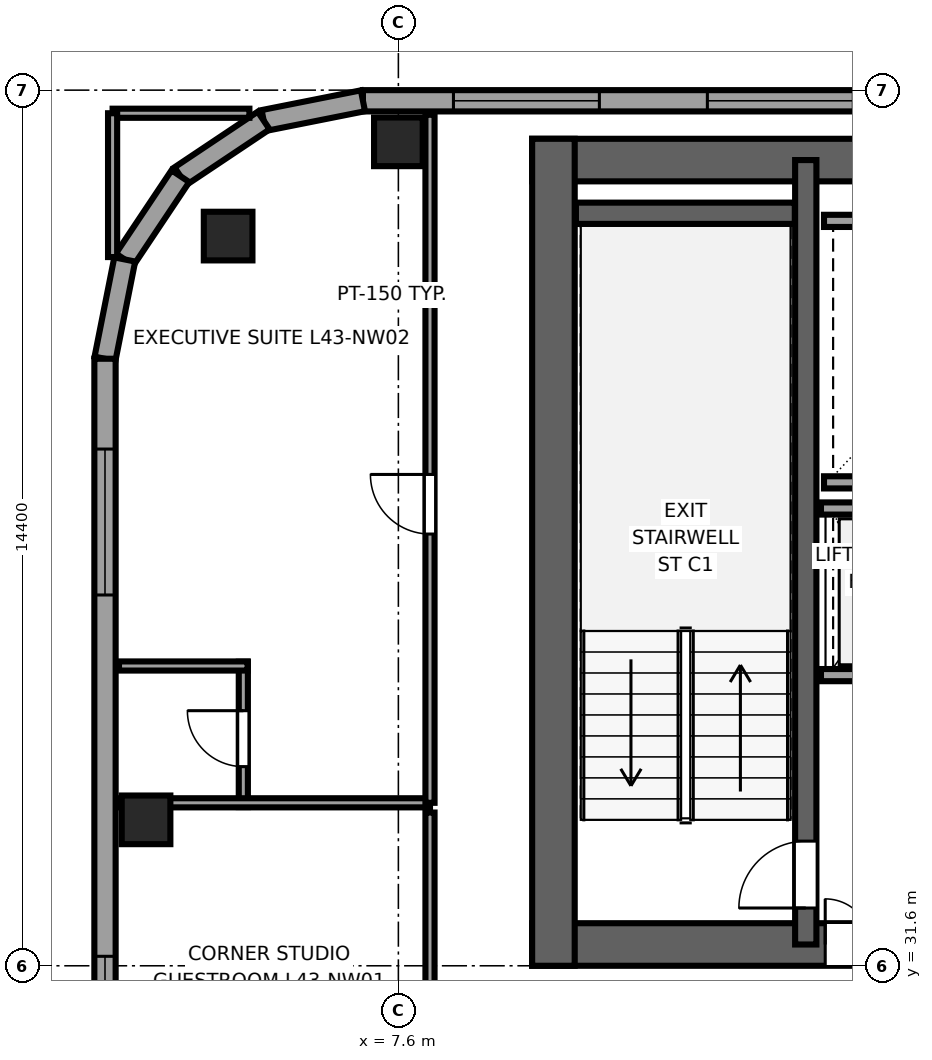
"""IFC4 building model, lengths in metres.
Left out: names, types, materials, properties, quantities, classifications, styles, units other than length and angle.
Written with IfcOpenShell. Run it as: python <this file> out.ifc"""

import sys

from ifc_helpers import new_model, si_unit, direction, frame, frame_2d, origin, origin_2d, place, context, subcontext, project, spatial, rectangle, extrude, source, transform, mapped, element, fill, save


model = new_model("IFC4")
c1 = context("Model", 3, precision=1e-05, world=origin(), true_north=direction((0.0, 1.0)))
c2 = subcontext(c1, "Body", "Model", "MODEL_VIEW")
j1 = project(units=[si_unit("LENGTHUNIT", "METRE"), si_unit("PLANEANGLEUNIT", "RADIAN")], contexts=[c1])
p1 = place(None, origin())
s1 = spatial("IfcSite", under=j1, at=p1, CompositionType="ELEMENT")
p2 = place(p1, origin())
s2 = spatial("IfcBuilding", under=s1, at=p2, CompositionType="ELEMENT")
p3 = place(p2, frame((0.0, 0.0, 164.8)))
s3 = spatial("IfcBuildingStorey", under=s2, at=p3, CompositionType="ELEMENT", Elevation=164.8)
p4 = place(p3, frame((9.8, 31.95, 0.0), z_axis=(0.0, 0.0, 1.0), x_axis=(1.0, 0.0, 0.0)))
e1 = element("IfcWall", 1, at=p4, inside=s3, PredefinedType="SHEAR", context=c2, shape_type="SweptSolid", body=[
    extrude(rectangle(XDim=26.4, YDim=0.7, at=frame_2d((13.2, 0.0))), origin(), (0.0, 0.0, 1.0), 3.55),
])
p5 = place(p4, frame((6.32, 0.0, 0.0), z_axis=(0.0, 0.0, 1.0), x_axis=(-1.0, 0.0, 0.0)))
e2 = element("IfcOpeningElement", 2, at=p5, cuts=e1, PredefinedType="OPENING", context=c2, shape_type="SweptSolid", body=[
    extrude(rectangle(XDim=1.5, YDim=2.04, at=frame_2d((0.75, 1.02))), frame((0.0, 0.36, 0.0), z_axis=(0.0, -1.0, 0.0), x_axis=(1.0, 0.0, 0.0)), (0.0, 0.0, 1.0), 0.72),
])
p6 = place(p4, frame((13.95, 0.0, 0.0), z_axis=(0.0, 0.0, 1.0), x_axis=(-1.0, 0.0, 0.0)))
e3 = element("IfcOpeningElement", 3, at=p6, cuts=e1, PredefinedType="OPENING", context=c2, shape_type="SweptSolid", body=[
    extrude(rectangle(XDim=1.5, YDim=2.04, at=frame_2d((0.75, 1.02))), frame((0.0, 0.36, 0.0), z_axis=(0.0, -1.0, 0.0), x_axis=(1.0, 0.0, 0.0)), (0.0, 0.0, 1.0), 0.72),
])
p7 = place(p4, frame((20.25, 0.0, 0.0), z_axis=(0.0, 0.0, 1.0), x_axis=(-1.0, 0.0, 0.0)))
e4 = element("IfcOpeningElement", 4, at=p7, cuts=e1, PredefinedType="OPENING", context=c2, shape_type="SweptSolid", body=[
    extrude(rectangle(XDim=1.5, YDim=2.04, at=frame_2d((0.75, 1.02))), frame((0.0, 0.36, 0.0), z_axis=(0.0, -1.0, 0.0), x_axis=(1.0, 0.0, 0.0)), (0.0, 0.0, 1.0), 0.72),
])
p8 = place(p4, frame((8.37, 0.0, 0.0), z_axis=(0.0, 0.0, 1.0), x_axis=(-1.0, 0.0, 0.0)))
e5 = element("IfcOpeningElement", 5, at=p8, cuts=e1, PredefinedType="OPENING", context=c2, shape_type="SweptSolid", body=[
    extrude(rectangle(XDim=0.82, YDim=2.01, at=frame_2d((0.41, 1.005))), frame((0.0, 0.36, 0.0), z_axis=(0.0, -1.0, 0.0), x_axis=(1.0, 0.0, 0.0)), (0.0, 0.0, 1.0), 0.72),
])
p9 = place(p3, frame((9.8, 44.85, 0.0), z_axis=(0.0, 0.0, 1.0), x_axis=(1.0, 0.0, 0.0)))
e6 = element("IfcWall", 6, at=p9, inside=s3, PredefinedType="SHEAR", context=c2, shape_type="SweptSolid", body=[
    extrude(rectangle(XDim=26.4, YDim=0.7, at=frame_2d((13.2, 0.0))), origin(), (0.0, 0.0, 1.0), 3.55),
])
p10 = place(p3, frame((10.15, 31.6, 0.0), z_axis=(0.0, 0.0, 1.0), x_axis=(0.0, 1.0, 0.0)))
e7 = element("IfcWall", 7, at=p10, inside=s3, PredefinedType="SHEAR", context=c2, shape_type="SweptSolid", body=[
    extrude(rectangle(XDim=13.6, YDim=0.7, at=frame_2d((6.8, 0.0))), origin(), (0.0, 0.0, 1.0), 3.55),
])
p11 = place(p3, frame((14.3, 31.95, 0.0), z_axis=(0.0, 0.0, 1.0), x_axis=(0.0, 1.0, 0.0)))
e8 = element("IfcWall", 8, at=p11, inside=s3, PredefinedType="SHEAR", context=c2, shape_type="SweptSolid", body=[
    extrude(rectangle(XDim=12.9, YDim=0.35, at=frame_2d((6.45, 0.0))), origin(), (0.0, 0.0, 1.0), 3.55),
])
p12 = place(p11, frame((0.6, 0.0, 0.0)))
e9 = element("IfcOpeningElement", 9, at=p12, cuts=e8, PredefinedType="OPENING", context=c2, shape_type="SweptSolid", body=[
    extrude(rectangle(XDim=1.1, YDim=2.12, at=frame_2d((0.55, 1.06))), frame((0.0, 0.185, 0.0), z_axis=(0.0, -1.0, 0.0), x_axis=(1.0, 0.0, 0.0)), (0.0, 0.0, 1.0), 0.37),
])
p13 = place(p3, frame((10.52, 43.975, 0.0), z_axis=(0.0, 0.0, 1.0), x_axis=(1.0, 0.0, 0.0)))
e10 = element("IfcWall", 10, at=p13, inside=s3, PredefinedType="SHEAR", context=c2, shape_type="SweptSolid", body=[
    extrude(rectangle(XDim=3.6, YDim=0.35, at=frame_2d((1.8, 0.0))), origin(), (0.0, 0.0, 1.0), 3.55),
])
m1 = source(origin(), c2, "Body", "SweptSolid", [
    extrude(rectangle(XDim=0.8, YDim=0.8, at=origin_2d()), origin(), (0.0, 0.0, 1.0), 3.55),
])
for number, where, z_axis, x_axis in (
    (11, (4.8, 43.6, 0.0), (0.0, 0.0, 1.0), (1.0, 0.0, 0.0)),
    (12, (7.6, 45.15, 0.0), (0.0, 0.0, 1.0), (1.0, 0.0, 0.0)),
    (13, (3.45, 34.0, 0.0), (0.0, 0.0, 1.0), (1.0, 0.0, 0.0)),
):
    element("IfcColumn", number, at=place(p3, frame(where, z_axis=z_axis, x_axis=x_axis)), inside=s3, PredefinedType="COLUMN", context=c2, shape_type="MappedRepresentation", body=[
        mapped(m1, transform((0.0, 0.0, 0.0), x_axis=(1.0, 0.0, 0.0), y_axis=(0.0, 1.0, 0.0), z_axis=(0.0, 0.0, 1.0), scale=1.0)),
    ])
p14 = place(p3, frame((49.983, 45.825, 0.0), z_axis=(0.0, 0.0, 1.0), x_axis=(-1.0, 0.0, 0.0)))
e14 = element("IfcWall", 14, at=p14, inside=s3, PredefinedType="SOLIDWALL", context=c2, shape_type="SweptSolid", body=[
    extrude(rectangle(XDim=42.966, YDim=0.35, at=frame_2d((21.483, 0.0))), origin(), (0.0, 0.0, 1.0), 3.37),
])
p15 = place(p14, frame((1.488, 0.0, 0.68)))
e15 = element("IfcOpeningElement", 15, at=p15, cuts=e14, PredefinedType="OPENING", context=c2, shape_type="SweptSolid", body=[
    extrude(rectangle(XDim=2.4, YDim=1.9, at=frame_2d((1.2, 0.95))), frame((0.0, 0.185, 0.0), z_axis=(0.0, -1.0, 0.0), x_axis=(1.0, 0.0, 0.0)), (0.0, 0.0, 1.0), 0.37),
])
p16 = place(p14, frame((9.841, 0.0, 0.68)))
e16 = element("IfcOpeningElement", 16, at=p16, cuts=e14, PredefinedType="OPENING", context=c2, shape_type="SweptSolid", body=[
    extrude(rectangle(XDim=2.4, YDim=1.9, at=frame_2d((1.2, 0.95))), frame((0.0, 0.185, 0.0), z_axis=(0.0, -1.0, 0.0), x_axis=(1.0, 0.0, 0.0)), (0.0, 0.0, 1.0), 0.37),
])
p17 = place(p14, frame((14.018, 0.0, 0.68)))
e17 = element("IfcOpeningElement", 17, at=p17, cuts=e14, PredefinedType="OPENING", context=c2, shape_type="SweptSolid", body=[
    extrude(rectangle(XDim=2.4, YDim=1.9, at=frame_2d((1.2, 0.95))), frame((0.0, 0.185, 0.0), z_axis=(0.0, -1.0, 0.0), x_axis=(1.0, 0.0, 0.0)), (0.0, 0.0, 1.0), 0.37),
])
p18 = place(p14, frame((18.195, 0.0, 0.68)))
e18 = element("IfcOpeningElement", 18, at=p18, cuts=e14, PredefinedType="OPENING", context=c2, shape_type="SweptSolid", body=[
    extrude(rectangle(XDim=2.4, YDim=1.9, at=frame_2d((1.2, 0.95))), frame((0.0, 0.185, 0.0), z_axis=(0.0, -1.0, 0.0), x_axis=(1.0, 0.0, 0.0)), (0.0, 0.0, 1.0), 0.37),
])
p19 = place(p14, frame((22.371, 0.0, 0.68)))
e19 = element("IfcOpeningElement", 19, at=p19, cuts=e14, PredefinedType="OPENING", context=c2, shape_type="SweptSolid", body=[
    extrude(rectangle(XDim=2.4, YDim=1.9, at=frame_2d((1.2, 0.95))), frame((0.0, 0.185, 0.0), z_axis=(0.0, -1.0, 0.0), x_axis=(1.0, 0.0, 0.0)), (0.0, 0.0, 1.0), 0.37),
])
p20 = place(p14, frame((26.548, 0.0, 0.68)))
e20 = element("IfcOpeningElement", 20, at=p20, cuts=e14, PredefinedType="OPENING", context=c2, shape_type="SweptSolid", body=[
    extrude(rectangle(XDim=2.4, YDim=1.9, at=frame_2d((1.2, 0.95))), frame((0.0, 0.185, 0.0), z_axis=(0.0, -1.0, 0.0), x_axis=(1.0, 0.0, 0.0)), (0.0, 0.0, 1.0), 0.37),
])
p21 = place(p14, frame((30.724, 0.0, 0.68)))
e21 = element("IfcOpeningElement", 21, at=p21, cuts=e14, PredefinedType="OPENING", context=c2, shape_type="SweptSolid", body=[
    extrude(rectangle(XDim=2.4, YDim=1.9, at=frame_2d((1.2, 0.95))), frame((0.0, 0.185, 0.0), z_axis=(0.0, -1.0, 0.0), x_axis=(1.0, 0.0, 0.0)), (0.0, 0.0, 1.0), 0.37),
])
p22 = place(p14, frame((34.901, 0.0, 0.68)))
e22 = element("IfcOpeningElement", 22, at=p22, cuts=e14, PredefinedType="OPENING", context=c2, shape_type="SweptSolid", body=[
    extrude(rectangle(XDim=2.4, YDim=1.9, at=frame_2d((1.2, 0.95))), frame((0.0, 0.185, 0.0), z_axis=(0.0, -1.0, 0.0), x_axis=(1.0, 0.0, 0.0)), (0.0, 0.0, 1.0), 0.37),
])
p23 = place(p14, frame((39.077, 0.0, 0.68)))
e23 = element("IfcOpeningElement", 23, at=p23, cuts=e14, PredefinedType="OPENING", context=c2, shape_type="SweptSolid", body=[
    extrude(rectangle(XDim=2.4, YDim=1.9, at=frame_2d((1.2, 0.95))), frame((0.0, 0.185, 0.0), z_axis=(0.0, -1.0, 0.0), x_axis=(1.0, 0.0, 0.0)), (0.0, 0.0, 1.0), 0.37),
])
p24 = place(p3, frame((7.017, 45.825, 0.0), z_axis=(0.0, 0.0, 1.0), x_axis=(-0.980788844421, -0.195072403631, 0.0)))
e24 = element("IfcWall", 24, at=p24, inside=s3, PredefinedType="SOLIDWALL", context=c2, shape_type="SweptSolid", body=[
    extrude(rectangle(XDim=1.665, YDim=0.35, at=frame_2d((0.832, 0.0))), origin(), (0.0, 0.0, 1.0), 3.37),
])
for number, where, z_axis, x_axis in (
    (25, (5.385, 45.5, 0.0), (0.0, 0.0, 1.0), (-0.832, -0.556, 0.0)),
    (26, (4.015, 44.585, 0.0), (0.0, 0.0, 1.0), (-0.556, -0.831, 0.0)),
):
    element("IfcWall", number, at=place(p3, frame(where, z_axis=z_axis, x_axis=x_axis)), inside=s3, PredefinedType="SOLIDWALL", context=c2, shape_type="SweptSolid", body=[
        extrude(rectangle(XDim=1.647, YDim=0.35, at=frame_2d((0.824, 0.0))), origin(), (0.0, 0.0, 1.0), 2.832),
    ])
p25 = place(p3, frame((3.1, 43.216, 0.0), z_axis=(0.0, 0.0, 1.0), x_axis=(-0.195044345786, -0.980794424524, 0.0)))
e27 = element("IfcWall", 27, at=p25, inside=s3, PredefinedType="SOLIDWALL", context=c2, shape_type="SweptSolid", body=[
    extrude(rectangle(XDim=1.665, YDim=0.35, at=frame_2d((0.833, 0.0))), origin(), (0.0, 0.0, 1.0), 3.37),
])
p26 = place(p3, frame((2.775, 41.583, 0.0), z_axis=(0.0, 0.0, 1.0), x_axis=(0.0, -1.0, 0.0)))
e28 = element("IfcWall", 28, at=p26, inside=s3, PredefinedType="SOLIDWALL", context=c2, shape_type="SweptSolid", body=[
    extrude(rectangle(XDim=34.566, YDim=0.35, at=frame_2d((17.283, 0.0))), origin(), (0.0, 0.0, 1.0), 3.37),
])
p27 = place(p26, frame((1.485, 0.0, 0.68)))
e29 = element("IfcOpeningElement", 29, at=p27, cuts=e28, PredefinedType="OPENING", context=c2, shape_type="SweptSolid", body=[
    extrude(rectangle(XDim=2.4, YDim=1.9, at=frame_2d((1.2, 0.95))), frame((0.0, 0.185, 0.0), z_axis=(0.0, -1.0, 0.0), x_axis=(1.0, 0.0, 0.0)), (0.0, 0.0, 1.0), 0.37),
])
p28 = place(p26, frame((9.827, 0.0, 0.68)))
e30 = element("IfcOpeningElement", 30, at=p28, cuts=e28, PredefinedType="OPENING", context=c2, shape_type="SweptSolid", body=[
    extrude(rectangle(XDim=2.4, YDim=1.9, at=frame_2d((1.2, 0.95))), frame((0.0, 0.185, 0.0), z_axis=(0.0, -1.0, 0.0), x_axis=(1.0, 0.0, 0.0)), (0.0, 0.0, 1.0), 0.37),
])
p29 = place(p26, frame((32.079, 0.0, 0.62)))
e31 = element("IfcOpeningElement", 31, at=p29, cuts=e28, PredefinedType="OPENING", context=c2, shape_type="SweptSolid", body=[
    extrude(rectangle(XDim=1.5, YDim=1.55, at=frame_2d((0.75, 0.775))), frame((0.0, 0.185, 0.0), z_axis=(0.0, -1.0, 0.0), x_axis=(1.0, 0.0, 0.0)), (0.0, 0.0, 1.0), 0.37),
])
p30 = place(p26, frame((28.583, 0.0, 0.62)))
e32 = element("IfcOpeningElement", 32, at=p30, cuts=e28, PredefinedType="OPENING", context=c2, shape_type="SweptSolid", body=[
    extrude(rectangle(XDim=1.5, YDim=1.55, at=frame_2d((0.75, 0.775))), frame((0.0, 0.185, 0.0), z_axis=(0.0, -1.0, 0.0), x_axis=(1.0, 0.0, 0.0)), (0.0, 0.0, 1.0), 0.37),
])
p31 = place(p26, frame((24.883, 0.0, 0.62)))
e33 = element("IfcOpeningElement", 33, at=p31, cuts=e28, PredefinedType="OPENING", context=c2, shape_type="SweptSolid", body=[
    extrude(rectangle(XDim=1.5, YDim=1.55, at=frame_2d((0.75, 0.775))), frame((0.0, 0.185, 0.0), z_axis=(0.0, -1.0, 0.0), x_axis=(1.0, 0.0, 0.0)), (0.0, 0.0, 1.0), 0.37),
])
p32 = place(p26, frame((21.183, 0.0, 0.62)))
e34 = element("IfcOpeningElement", 34, at=p32, cuts=e28, PredefinedType="OPENING", context=c2, shape_type="SweptSolid", body=[
    extrude(rectangle(XDim=1.5, YDim=1.55, at=frame_2d((0.75, 0.775))), frame((0.0, 0.185, 0.0), z_axis=(0.0, -1.0, 0.0), x_axis=(1.0, 0.0, 0.0)), (0.0, 0.0, 1.0), 0.37),
])
for number, where, z_axis, x_axis in (
    (35, (14.6, 39.55, 0.0), (0.0, 0.0, 1.0), (1.0, 0.0, 0.0)),
    (36, (14.6, 43.85, 0.0), (0.0, 0.0, 1.0), (1.0, 0.0, 0.0)),
):
    element("IfcWall", number, at=place(p3, frame(where, z_axis=z_axis, x_axis=x_axis)), inside=s3, PredefinedType="SOLIDWALL", context=c2, shape_type="SweptSolid", body=[
        extrude(rectangle(XDim=4.1, YDim=0.2, at=frame_2d((2.05, 0.0))), origin(), (0.0, 0.0, 1.0), 3.37),
    ])
p33 = place(p3, frame((14.55, 36.38, 0.0), z_axis=(0.0, 0.0, 1.0), x_axis=(1.0, 0.0, 0.0)))
e37 = element("IfcWall", 37, at=p33, inside=s3, PredefinedType="SOLIDWALL", context=c2, shape_type="SweptSolid", body=[
    extrude(rectangle(XDim=4.075, YDim=0.2, at=frame_2d((2.038, 0.0))), origin(), (0.0, 0.0, 1.0), 3.37),
])
p34 = place(p33, frame((0.55, 0.0, 0.0)))
e38 = element("IfcOpeningElement", 38, at=p34, cuts=e37, PredefinedType="OPENING", context=c2, shape_type="SweptSolid", body=[
    extrude(rectangle(XDim=1.1, YDim=2.12, at=frame_2d((0.55, 1.06))), frame((0.0, 0.11, 0.0), z_axis=(0.0, -1.0, 0.0), x_axis=(1.0, 0.0, 0.0)), (0.0, 0.0, 1.0), 0.22),
])
p35 = place(p33, frame((2.45, 0.0, 0.0)))
e39 = element("IfcOpeningElement", 39, at=p35, cuts=e37, PredefinedType="OPENING", context=c2, shape_type="SweptSolid", body=[
    extrude(rectangle(XDim=1.1, YDim=2.12, at=frame_2d((0.55, 1.06))), frame((0.0, 0.11, 0.0), z_axis=(0.0, -1.0, 0.0), x_axis=(1.0, 0.0, 0.0)), (0.0, 0.0, 1.0), 0.22),
])
p36 = place(p3, frame((14.55, 39.12, 0.0), z_axis=(0.0, 0.0, 1.0), x_axis=(1.0, 0.0, 0.0)))
e40 = element("IfcWall", 40, at=p36, inside=s3, PredefinedType="SOLIDWALL", context=c2, shape_type="SweptSolid", body=[
    extrude(rectangle(XDim=4.075, YDim=0.2, at=frame_2d((2.038, 0.0))), origin(), (0.0, 0.0, 1.0), 3.37),
])
p37 = place(p3, frame((5.05, 34.21, 0.0), z_axis=(0.0, 0.0, 1.0), x_axis=(0.0, 1.0, 0.0)))
e41 = element("IfcWall", 41, at=p37, inside=s3, PredefinedType="PARTITIONING", context=c2, shape_type="SweptSolid", body=[
    extrude(rectangle(XDim=2.39, YDim=0.15, at=frame_2d((1.195, 0.0))), origin(), (0.0, 0.0, 1.0), 3.37),
])
p38 = place(p37, frame((0.665, 0.0, 0.0)))
e42 = element("IfcOpeningElement", 42, at=p38, cuts=e41, PredefinedType="OPENING", context=c2, shape_type="SweptSolid", body=[
    extrude(rectangle(XDim=0.92, YDim=2.01, at=frame_2d((0.46, 1.005))), frame((0.0, 0.085, 0.0), z_axis=(0.0, -1.0, 0.0), x_axis=(1.0, 0.0, 0.0)), (0.0, 0.0, 1.0), 0.17),
])
p39 = place(p3, frame((3.005, 34.28, 0.0), z_axis=(0.0, 0.0, 1.0), x_axis=(1.0, 0.0, 0.0)))
e43 = element("IfcWall", 43, at=p39, inside=s3, PredefinedType="PARTITIONING", context=c2, shape_type="SweptSolid", body=[
    extrude(rectangle(XDim=5.115, YDim=0.15, at=frame_2d((2.558, 0.0))), origin(), (0.0, 0.0, 1.0), 2.16),
])
p40 = place(p3, frame((3.005, 36.53, 0.0), z_axis=(0.0, 0.0, 1.0), x_axis=(1.0, 0.0, 0.0)))
e44 = element("IfcWall", 44, at=p40, inside=s3, PredefinedType="PARTITIONING", context=c2, shape_type="SweptSolid", body=[
    extrude(rectangle(XDim=2.115, YDim=0.15, at=frame_2d((1.058, 0.0))), origin(), (0.0, 0.0, 1.0), 3.37),
])
p41 = place(p3, frame((8.12, 24.73, 0.0), z_axis=(0.0, 0.0, 1.0), x_axis=(0.0, 1.0, 0.0)))
e45 = element("IfcWall", 45, at=p41, inside=s3, PredefinedType="PARTITIONING", context=c2, shape_type="SweptSolid", body=[
    extrude(rectangle(XDim=9.39, YDim=0.15, at=frame_2d((4.695, 0.0))), origin(), (0.0, 0.0, 1.0), 3.37),
])
p42 = place(p41, frame((4.205, 0.0, 0.0)))
e46 = element("IfcOpeningElement", 46, at=p42, cuts=e45, PredefinedType="OPENING", context=c2, shape_type="SweptSolid", body=[
    extrude(rectangle(XDim=0.98, YDim=2.12, at=frame_2d((0.49, 1.06))), frame((0.0, 0.085, 0.0), z_axis=(0.0, -1.0, 0.0), x_axis=(1.0, 0.0, 0.0)), (0.0, 0.0, 1.0), 0.17),
])
p43 = place(p3, frame((8.12, 34.28, 0.0), z_axis=(0.0, 0.0, 1.0), x_axis=(0.0, 1.0, 0.0)))
e47 = element("IfcWall", 47, at=p43, inside=s3, PredefinedType="PARTITIONING", context=c2, shape_type="SweptSolid", body=[
    extrude(rectangle(XDim=11.315, YDim=0.15, at=frame_2d((5.657, 0.0))), origin(), (0.0, 0.0, 1.0), 3.37),
])
p44 = place(p43, frame((4.42, 0.0, 0.0)))
e48 = element("IfcOpeningElement", 48, at=p44, cuts=e47, PredefinedType="OPENING", context=c2, shape_type="SweptSolid", body=[
    extrude(rectangle(XDim=0.98, YDim=2.12, at=frame_2d((0.49, 1.06))), frame((0.0, 0.085, 0.0), z_axis=(0.0, -1.0, 0.0), x_axis=(1.0, 0.0, 0.0)), (0.0, 0.0, 1.0), 0.17),
])
p45 = place(p3, frame((2.9, 45.62, 0.0), z_axis=(0.0, 0.0, 1.0), x_axis=(1.0, 0.0, 0.0)))
e49 = element("IfcWall", 49, at=p45, inside=s3, PredefinedType="PARTITIONING", context=c2, shape_type="SweptSolid", body=[
    extrude(rectangle(XDim=2.25, YDim=0.15, at=frame_2d((1.125, 0.0))), origin(), (0.0, 0.0, 1.0), 3.37),
])
p46 = place(p3, frame((2.9, 43.255, 0.0), z_axis=(0.0, 0.0, 1.0), x_axis=(0.0, 1.0, 0.0)))
e50 = element("IfcWall", 50, at=p46, inside=s3, PredefinedType="PARTITIONING", context=c2, shape_type="SweptSolid", body=[
    extrude(rectangle(XDim=2.365, YDim=0.15, at=frame_2d((1.183, 0.0))), origin(), (0.0, 0.0, 1.0), 3.37),
])
m2 = source(origin(), c2, "Body", "SweptSolid", [
    extrude(rectangle(XDim=2.4, YDim=1.9, at=frame_2d((1.2, 0.95))), frame((0.0, 0.09, 0.0), z_axis=(0.0, -1.0, 0.0), x_axis=(1.0, 0.0, 0.0)), (0.0, 0.0, 1.0), 0.06),
])
p47 = place(p22, origin())
e51 = element("IfcWindow", 51, at=p47, inside=s3, PartitioningType="TRIPLE_PANEL_HORIZONTAL", PredefinedType="WINDOW", context=c2, shape_type="MappedRepresentation", body=[
    mapped(m2, transform((0.0, 0.0, 0.0), x_axis=(1.0, 0.0, 0.0), y_axis=(0.0, 1.0, 0.0), z_axis=(0.0, 0.0, 1.0), scale=1.0)),
])
fill(e22, e51)
p48 = place(p23, origin())
e52 = element("IfcWindow", 52, at=p48, inside=s3, PartitioningType="TRIPLE_PANEL_HORIZONTAL", PredefinedType="WINDOW", context=c2, shape_type="MappedRepresentation", body=[
    mapped(m2, transform((0.0, 0.0, 0.0), x_axis=(1.0, 0.0, 0.0), y_axis=(0.0, 1.0, 0.0), z_axis=(0.0, 0.0, 1.0), scale=1.0)),
])
fill(e23, e52)
p49 = place(p27, origin())
e53 = element("IfcWindow", 53, at=p49, inside=s3, PartitioningType="TRIPLE_PANEL_HORIZONTAL", PredefinedType="WINDOW", context=c2, shape_type="MappedRepresentation", body=[
    mapped(m2, transform((0.0, 0.0, 0.0), x_axis=(1.0, 0.0, 0.0), y_axis=(0.0, 1.0, 0.0), z_axis=(0.0, 0.0, 1.0), scale=1.0)),
])
fill(e29, e53)
p50 = place(p28, origin())
e54 = element("IfcWindow", 54, at=p50, inside=s3, PartitioningType="TRIPLE_PANEL_HORIZONTAL", PredefinedType="WINDOW", context=c2, shape_type="MappedRepresentation", body=[
    mapped(m2, transform((0.0, 0.0, 0.0), x_axis=(1.0, 0.0, 0.0), y_axis=(0.0, 1.0, 0.0), z_axis=(0.0, 0.0, 1.0), scale=1.0)),
])
fill(e30, e54)
m3 = source(origin(), c2, "Body", "SweptSolid", [
    extrude(rectangle(XDim=1.1, YDim=2.12, at=frame_2d((0.55, 1.06))), frame((0.0, 0.025, 0.0), z_axis=(0.0, -1.0, 0.0), x_axis=(1.0, 0.0, 0.0)), (0.0, 0.0, 1.0), 0.05),
])
p51 = place(p12, origin())
e55 = element("IfcDoor", 55, at=p51, inside=s3, OperationType="SINGLE_SWING_LEFT", PredefinedType="DOOR", context=c2, shape_type="MappedRepresentation", body=[
    mapped(m3, transform((0.0, 0.0, 0.0), x_axis=(1.0, 0.0, 0.0), y_axis=(0.0, 1.0, 0.0), z_axis=(0.0, 0.0, 1.0), scale=1.0)),
])
fill(e9, e55)
m4 = source(origin(), c2, "Body", "SweptSolid", [
    extrude(rectangle(XDim=1.5, YDim=2.04, at=frame_2d((0.75, 1.02))), frame((0.0, 0.025, 0.0), z_axis=(0.0, -1.0, 0.0), x_axis=(1.0, 0.0, 0.0)), (0.0, 0.0, 1.0), 0.05),
])
p52 = place(p5, origin())
e56 = element("IfcDoor", 56, at=p52, inside=s3, OperationType="DOUBLE_DOOR_SINGLE_SWING", PredefinedType="DOOR", context=c2, shape_type="MappedRepresentation", body=[
    mapped(m4, transform((0.0, 0.0, 0.0), x_axis=(1.0, 0.0, 0.0), y_axis=(0.0, 1.0, 0.0), z_axis=(0.0, 0.0, 1.0), scale=1.0)),
])
fill(e2, e56)
m5 = source(origin(), c2, "Body", "SweptSolid", [
    extrude(rectangle(XDim=0.92, YDim=2.01, at=frame_2d((0.46, 1.005))), frame((0.0, 0.025, 0.0), z_axis=(0.0, -1.0, 0.0), x_axis=(1.0, 0.0, 0.0)), (0.0, 0.0, 1.0), 0.05),
])
p53 = place(p38, origin())
e57 = element("IfcDoor", 57, at=p53, inside=s3, OperationType="SINGLE_SWING_RIGHT", PredefinedType="DOOR", context=c2, shape_type="MappedRepresentation", body=[
    mapped(m5, transform((0.0, 0.0, 0.0), x_axis=(1.0, 0.0, 0.0), y_axis=(0.0, 1.0, 0.0), z_axis=(0.0, 0.0, 1.0), scale=1.0)),
])
fill(e42, e57)
m6 = source(origin(), c2, "Body", "SweptSolid", [
    extrude(rectangle(XDim=0.98, YDim=2.12, at=frame_2d((0.49, 1.06))), frame((0.0, 0.025, 0.0), z_axis=(0.0, -1.0, 0.0), x_axis=(1.0, 0.0, 0.0)), (0.0, 0.0, 1.0), 0.05),
])
p54 = place(p44, origin())
e58 = element("IfcDoor", 58, at=p54, inside=s3, OperationType="SINGLE_SWING_RIGHT", PredefinedType="DOOR", context=c2, shape_type="MappedRepresentation", body=[
    mapped(m6, transform((0.0, 0.0, 0.0), x_axis=(1.0, 0.0, 0.0), y_axis=(0.0, 1.0, 0.0), z_axis=(0.0, 0.0, 1.0), scale=1.0)),
])
fill(e48, e58)
save(model, sys.argv[1])
